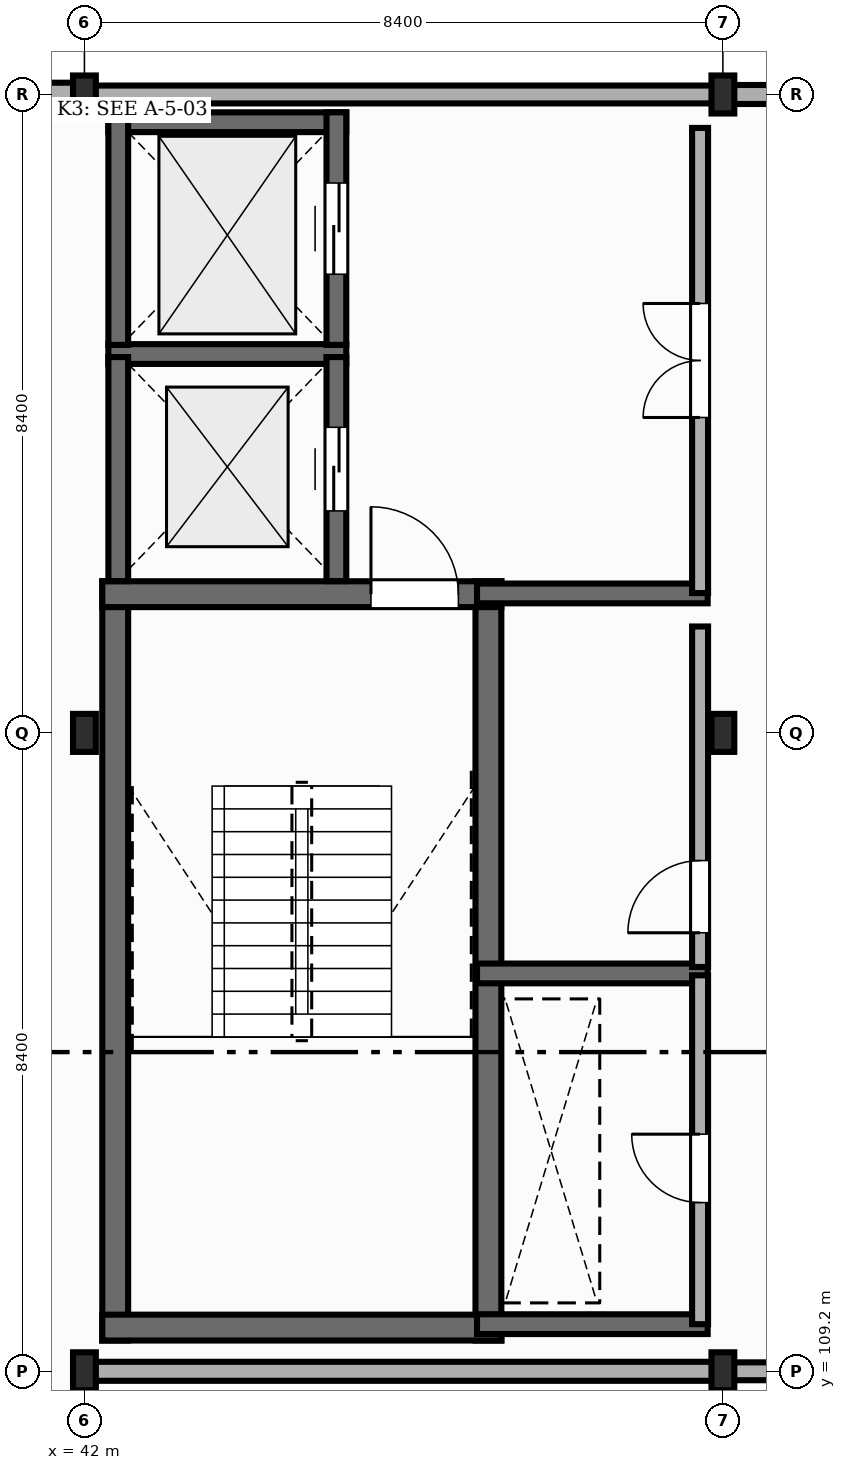
"""IFC4 building model, lengths in metres.
Left out: names, types, materials, properties, quantities, classifications, styles, units other than length and angle.
Written with IfcOpenShell. Run it as: python <this file> out.ifc"""

import sys

from ifc_helpers import new_model, si_unit, direction, frame, frame_2d, origin, origin_2d, place, context, subcontext, project, spatial, rectangle, i_section, extrude, element, fill, save


model = new_model("IFC4")
c1 = context("Model", 3, precision=1e-05, world=origin(), true_north=direction((0.0, 1.0)))
c2 = subcontext(c1, "Body", "Model", "MODEL_VIEW")
j1 = project(units=[si_unit("LENGTHUNIT", "METRE"), si_unit("PLANEANGLEUNIT", "RADIAN")], contexts=[c1])
p1 = place(None, origin())
s1 = spatial("IfcSite", under=j1, at=p1, CompositionType="ELEMENT")
p2 = place(p1, origin())
s2 = spatial("IfcBuilding", under=s1, at=p2, CompositionType="ELEMENT")
p3 = place(p2, frame((0.0, 0.0, 9.9)))
s3 = spatial("IfcBuildingStorey", under=s2, at=p3, CompositionType="ELEMENT", Elevation=9.9)
for number, where, z_axis, x_axis in (
    (1, (42.0, 109.2, 0.0), (0.0, 0.0, 1.0), (1.0, 0.0, 0.0)),
    (2, (42.0, 117.6, 0.0), (0.0, 0.0, 1.0), (1.0, 0.0, 0.0)),
    (3, (42.0, 126.0, 0.0), (0.0, 0.0, 1.0), (1.0, 0.0, 0.0)),
    (4, (50.4, 109.2, 0.0), (0.0, 0.0, 1.0), (1.0, 0.0, 0.0)),
    (5, (50.4, 117.6, 0.0), (0.0, 0.0, 1.0), (1.0, 0.0, 0.0)),
    (6, (50.4, 126.0, 0.0), (0.0, 0.0, 1.0), (1.0, 0.0, 0.0)),
):
    element("IfcColumn", number, at=place(p3, frame(where, z_axis=z_axis, x_axis=x_axis)), inside=s3, PredefinedType="COLUMN", context=c2, shape_type="SweptSolid", body=[
        extrude(i_section(OverallWidth=0.3, OverallDepth=0.5, WebThickness=0.014, FlangeThickness=0.028, FilletRadius=0.027, at=origin_2d()), origin(), (0.0, 0.0, 1.0), 4.05),
    ])
p4 = place(p3, frame((58.792, 126.0, 0.0), z_axis=(0.0, 0.0, 1.0), x_axis=(-1.0, 0.0, 0.0)))
e7 = element("IfcWall", 7, at=p4, inside=s3, PredefinedType="STANDARD", context=c2, shape_type="SweptSolid", body=[
    extrude(rectangle(XDim=8.384, YDim=0.25, at=frame_2d((4.192, 0.0))), origin(), (0.0, 0.0, 1.0), 3.502),
])
p5 = place(p3, frame((50.392, 126.0, 0.0), z_axis=(0.0, 0.0, 1.0), x_axis=(-1.0, 0.0, 0.0)))
e8 = element("IfcWall", 8, at=p5, inside=s3, PredefinedType="STANDARD", context=c2, shape_type="SweptSolid", body=[
    extrude(rectangle(XDim=8.384, YDim=0.235, at=frame_2d((4.192, 0.0))), origin(), (0.0, 0.0, 1.0), 3.472),
])
p6 = place(p3, frame((41.992, 126.0, 0.0), z_axis=(0.0, 0.0, 1.0), x_axis=(-1.0, 0.0, 0.0)))
e9 = element("IfcWall", 9, at=p6, inside=s3, PredefinedType="STANDARD", context=c2, shape_type="SweptSolid", body=[
    extrude(rectangle(XDim=8.384, YDim=0.31, at=frame_2d((4.192, 0.0))), origin(), (0.0, 0.0, 1.0), 3.502),
])
p7 = place(p3, frame((42.0, 100.996, 0.0), z_axis=(0.0, 0.0, 1.0), x_axis=(0.0, 1.0, 0.0)))
e10 = element("IfcWall", 10, at=p7, inside=s3, PredefinedType="STANDARD", context=c2, shape_type="SweptSolid", body=[
    extrude(rectangle(XDim=7.958, YDim=0.265, at=frame_2d((3.979, 0.0))), origin(), (0.0, 0.0, 1.0), 3.562),
])
p8 = place(p3, frame((42.008, 109.2, 0.0), z_axis=(0.0, 0.0, 1.0), x_axis=(1.0, 0.0, 0.0)))
e11 = element("IfcWall", 11, at=p8, inside=s3, PredefinedType="STANDARD", context=c2, shape_type="SweptSolid", body=[
    extrude(rectangle(XDim=8.384, YDim=0.25, at=frame_2d((4.192, 0.0))), origin(), (0.0, 0.0, 1.0), 3.232),
])
p9 = place(p3, frame((50.408, 109.2, 0.0), z_axis=(0.0, 0.0, 1.0), x_axis=(1.0, 0.0, 0.0)))
e12 = element("IfcWall", 12, at=p9, inside=s3, PredefinedType="STANDARD", context=c2, shape_type="SweptSolid", body=[
    extrude(rectangle(XDim=8.384, YDim=0.235, at=frame_2d((4.192, 0.0))), origin(), (0.0, 0.0, 1.0), 3.502),
])
for number, where, z_axis, x_axis in (
    (13, (42.405, 109.605, 0.0), (0.0, 0.0, 1.0), (0.0, 1.0, 0.0)),
    (14, (47.315, 109.605, 0.0), (0.0, 0.0, 1.0), (0.0, 1.0, 0.0)),
):
    element("IfcWall", number, at=place(p3, frame(where, z_axis=z_axis, x_axis=x_axis)), inside=s3, PredefinedType="SHEAR", context=c2, shape_type="SweptSolid", body=[
        extrude(rectangle(XDim=9.99, YDim=0.34, at=frame_2d((4.995, 0.0))), origin(), (0.0, 0.0, 1.0), 3.84),
    ])
p10 = place(p3, frame((42.235, 109.775, 0.0), z_axis=(0.0, 0.0, 1.0), x_axis=(1.0, 0.0, 0.0)))
e15 = element("IfcWall", 15, at=p10, inside=s3, PredefinedType="SHEAR", context=c2, shape_type="SweptSolid", body=[
    extrude(rectangle(XDim=5.25, YDim=0.34, at=frame_2d((2.625, 0.0))), origin(), (0.0, 0.0, 1.0), 3.84),
])
p11 = place(p3, frame((42.235, 119.425, 0.0), z_axis=(0.0, 0.0, 1.0), x_axis=(1.0, 0.0, 0.0)))
e16 = element("IfcWall", 16, at=p11, inside=s3, PredefinedType="SHEAR", context=c2, shape_type="SweptSolid", body=[
    extrude(rectangle(XDim=5.25, YDim=0.34, at=frame_2d((2.625, 0.0))), origin(), (0.0, 0.0, 1.0), 3.84),
])
p12 = place(p11, frame((3.535, 0.0, 0.0)))
e17 = element("IfcOpeningElement", 17, at=p12, cuts=e16, PredefinedType="OPENING", context=c2, shape_type="SweptSolid", body=[
    extrude(rectangle(XDim=1.15, YDim=2.15, at=frame_2d((0.575, 1.075))), frame((0.0, 0.18, 0.0), z_axis=(0.0, -1.0, 0.0), x_axis=(1.0, 0.0, 0.0)), (0.0, 0.0, 1.0), 0.36),
])
p13 = place(p3, frame((42.315, 122.585, 0.0), z_axis=(0.0, 0.0, 1.0), x_axis=(1.0, 0.0, 0.0)))
e18 = element("IfcWall", 18, at=p13, inside=s3, PredefinedType="SHEAR", context=c2, shape_type="SweptSolid", body=[
    extrude(rectangle(XDim=3.13, YDim=0.26, at=frame_2d((1.565, 0.0))), origin(), (0.0, 0.0, 1.0), 3.84),
])
p14 = place(p3, frame((42.445, 119.597, 0.0), z_axis=(0.0, 0.0, 1.0), x_axis=(0.0, 1.0, 0.0)))
e19 = element("IfcWall", 19, at=p14, inside=s3, PredefinedType="SHEAR", context=c2, shape_type="SweptSolid", body=[
    extrude(rectangle(XDim=2.948, YDim=0.26, at=frame_2d((1.474, 0.0))), origin(), (0.0, 0.0, 1.0), 3.84),
])
p15 = place(p3, frame((45.315, 119.597, 0.0), z_axis=(0.0, 0.0, 1.0), x_axis=(0.0, 1.0, 0.0)))
e20 = element("IfcWall", 20, at=p15, inside=s3, PredefinedType="SHEAR", context=c2, shape_type="SweptSolid", body=[
    extrude(rectangle(XDim=2.948, YDim=0.26, at=frame_2d((1.474, 0.0))), origin(), (0.0, 0.0, 1.0), 3.84),
])
p16 = place(p15, frame((0.924, 0.0, 0.0)))
e21 = element("IfcOpeningElement", 21, at=p16, cuts=e20, PredefinedType="OPENING", context=c2, shape_type="SweptSolid", body=[
    extrude(rectangle(XDim=1.1, YDim=2.15, at=frame_2d((0.55, 1.075))), frame((0.0, 0.14, 0.0), z_axis=(0.0, -1.0, 0.0), x_axis=(1.0, 0.0, 0.0)), (0.0, 0.0, 1.0), 0.28),
])
p17 = place(p3, frame((42.315, 125.635, 0.0), z_axis=(0.0, 0.0, 1.0), x_axis=(1.0, 0.0, 0.0)))
e22 = element("IfcWall", 22, at=p17, inside=s3, PredefinedType="SHEAR", context=c2, shape_type="SweptSolid", body=[
    extrude(rectangle(XDim=3.13, YDim=0.26, at=frame_2d((1.565, 0.0))), origin(), (0.0, 0.0, 1.0), 3.84),
])
p18 = place(p3, frame((42.445, 122.705, 0.0), z_axis=(0.0, 0.0, 1.0), x_axis=(0.0, 1.0, 0.0)))
e23 = element("IfcWall", 23, at=p18, inside=s3, PredefinedType="SHEAR", context=c2, shape_type="SweptSolid", body=[
    extrude(rectangle(XDim=3.06, YDim=0.26, at=frame_2d((1.53, 0.0))), origin(), (0.0, 0.0, 1.0), 3.84),
])
p19 = place(p3, frame((45.315, 122.705, 0.0), z_axis=(0.0, 0.0, 1.0), x_axis=(0.0, 1.0, 0.0)))
e24 = element("IfcWall", 24, at=p19, inside=s3, PredefinedType="SHEAR", context=c2, shape_type="SweptSolid", body=[
    extrude(rectangle(XDim=3.06, YDim=0.26, at=frame_2d((1.53, 0.0))), origin(), (0.0, 0.0, 1.0), 3.84),
])
p20 = place(p19, frame((0.93, 0.0, 0.0)))
e25 = element("IfcOpeningElement", 25, at=p20, cuts=e24, PredefinedType="OPENING", context=c2, shape_type="SweptSolid", body=[
    extrude(rectangle(XDim=1.2, YDim=2.15, at=frame_2d((0.6, 1.075))), frame((0.0, 0.14, 0.0), z_axis=(0.0, -1.0, 0.0), x_axis=(1.0, 0.0, 0.0)), (0.0, 0.0, 1.0), 0.28),
])
for number, where, z_axis, x_axis in (
    (26, (47.165, 109.82, 0.0), (0.0, 0.0, 1.0), (1.0, 0.0, 0.0)),
    (27, (47.165, 114.435, 0.0), (0.0, 0.0, 1.0), (1.0, 0.0, 0.0)),
    (28, (47.165, 119.435, 0.0), (0.0, 0.0, 1.0), (1.0, 0.0, 0.0)),
):
    element("IfcWall", number, at=place(p3, frame(where, z_axis=z_axis, x_axis=x_axis)), inside=s3, PredefinedType="SHEAR", context=c2, shape_type="SweptSolid", body=[
        extrude(rectangle(XDim=3.035, YDim=0.26, at=frame_2d((1.518, 0.0))), origin(), (0.0, 0.0, 1.0), 3.84),
    ])
p21 = place(p3, frame((50.1, 109.82, 0.0), z_axis=(0.0, 0.0, 1.0), x_axis=(0.0, 1.0, 0.0)))
e29 = element("IfcWall", 29, at=p21, inside=s3, PredefinedType="STANDARD", context=c2, shape_type="SweptSolid", body=[
    extrude(rectangle(XDim=4.59, YDim=0.21, at=frame_2d((2.295, 0.0))), origin(), (0.0, 0.0, 1.0), 3.482),
])
p22 = place(p21, frame((1.6, 0.0, 0.0)))
e30 = element("IfcOpeningElement", 30, at=p22, cuts=e29, PredefinedType="OPENING", context=c2, shape_type="SweptSolid", body=[
    extrude(rectangle(XDim=0.9, YDim=2.1, at=frame_2d((0.45, 1.05))), frame((0.0, 0.115, 0.0), z_axis=(0.0, -1.0, 0.0), x_axis=(1.0, 0.0, 0.0)), (0.0, 0.0, 1.0), 0.23),
])
p23 = place(p3, frame((50.1, 114.52, 0.0), z_axis=(0.0, 0.0, 1.0), x_axis=(0.0, 1.0, 0.0)))
e31 = element("IfcWall", 31, at=p23, inside=s3, PredefinedType="STANDARD", context=c2, shape_type="SweptSolid", body=[
    extrude(rectangle(XDim=4.48, YDim=0.21, at=frame_2d((2.24, 0.0))), origin(), (0.0, 0.0, 1.0), 3.482),
])
p24 = place(p23, frame((0.45, 0.0, 0.0)))
e32 = element("IfcOpeningElement", 32, at=p24, cuts=e31, PredefinedType="OPENING", context=c2, shape_type="SweptSolid", body=[
    extrude(rectangle(XDim=0.95, YDim=2.15, at=frame_2d((0.475, 1.075))), frame((0.0, 0.115, 0.0), z_axis=(0.0, -1.0, 0.0), x_axis=(1.0, 0.0, 0.0)), (0.0, 0.0, 1.0), 0.23),
])
p25 = place(p3, frame((50.1, 119.44, 0.0), z_axis=(0.0, 0.0, 1.0), x_axis=(0.0, 1.0, 0.0)))
e33 = element("IfcWall", 33, at=p25, inside=s3, PredefinedType="STANDARD", context=c2, shape_type="SweptSolid", body=[
    extrude(rectangle(XDim=6.12, YDim=0.21, at=frame_2d((3.06, 0.0))), origin(), (0.0, 0.0, 1.0), 3.522),
])
p26 = place(p25, frame((2.31, 0.0, 0.0)))
e34 = element("IfcOpeningElement", 34, at=p26, cuts=e33, PredefinedType="OPENING", context=c2, shape_type="SweptSolid", body=[
    extrude(rectangle(XDim=1.5, YDim=2.2, at=frame_2d((0.75, 1.1))), frame((0.0, 0.115, 0.0), z_axis=(0.0, -1.0, 0.0), x_axis=(1.0, 0.0, 0.0)), (0.0, 0.0, 1.0), 0.23),
])
p27 = place(p12, origin())
e35 = element("IfcDoor", 35, at=p27, inside=s3, OperationType="SINGLE_SWING_LEFT", PredefinedType="DOOR", context=c2, shape_type="SweptSolid", body=[
    extrude(rectangle(XDim=1.15, YDim=2.15, at=frame_2d((0.575, 1.075))), frame((0.0, 0.025, 0.0), z_axis=(0.0, -1.0, 0.0), x_axis=(1.0, 0.0, 0.0)), (0.0, 0.0, 1.0), 0.05),
])
fill(e17, e35)
p28 = place(p16, origin())
e36 = element("IfcDoor", 36, at=p28, inside=s3, OperationType="DOUBLE_DOOR_SLIDING", PredefinedType="DOOR", context=c2, shape_type="SweptSolid", body=[
    extrude(rectangle(XDim=1.1, YDim=2.15, at=frame_2d((0.55, 1.075))), frame((0.0, 0.025, 0.0), z_axis=(0.0, -1.0, 0.0), x_axis=(1.0, 0.0, 0.0)), (0.0, 0.0, 1.0), 0.05),
])
fill(e21, e36)
p29 = place(p20, origin())
e37 = element("IfcDoor", 37, at=p29, inside=s3, OperationType="DOUBLE_DOOR_SLIDING", PredefinedType="DOOR", context=c2, shape_type="SweptSolid", body=[
    extrude(rectangle(XDim=1.2, YDim=2.15, at=frame_2d((0.6, 1.075))), frame((0.0, 0.025, 0.0), z_axis=(0.0, -1.0, 0.0), x_axis=(1.0, 0.0, 0.0)), (0.0, 0.0, 1.0), 0.05),
])
fill(e25, e37)
p30 = place(p22, origin())
e38 = element("IfcDoor", 38, at=p30, inside=s3, OperationType="SINGLE_SWING_RIGHT", PredefinedType="DOOR", context=c2, shape_type="SweptSolid", body=[
    extrude(rectangle(XDim=0.9, YDim=2.1, at=frame_2d((0.45, 1.05))), frame((0.0, 0.025, 0.0), z_axis=(0.0, -1.0, 0.0), x_axis=(1.0, 0.0, 0.0)), (0.0, 0.0, 1.0), 0.05),
])
fill(e30, e38)
p31 = place(p24, origin())
e39 = element("IfcDoor", 39, at=p31, inside=s3, OperationType="SINGLE_SWING_LEFT", PredefinedType="DOOR", context=c2, shape_type="SweptSolid", body=[
    extrude(rectangle(XDim=0.95, YDim=2.15, at=frame_2d((0.475, 1.075))), frame((0.0, 0.025, 0.0), z_axis=(0.0, -1.0, 0.0), x_axis=(1.0, 0.0, 0.0)), (0.0, 0.0, 1.0), 0.05),
])
fill(e32, e39)
p32 = place(p26, origin())
e40 = element("IfcDoor", 40, at=p32, inside=s3, OperationType="DOUBLE_DOOR_SINGLE_SWING", PredefinedType="DOOR", context=c2, shape_type="SweptSolid", body=[
    extrude(rectangle(XDim=1.5, YDim=2.2, at=frame_2d((0.75, 1.1))), frame((0.0, 0.025, 0.0), z_axis=(0.0, -1.0, 0.0), x_axis=(1.0, 0.0, 0.0)), (0.0, 0.0, 1.0), 0.05),
])
fill(e34, e40)
save(model, sys.argv[1])
